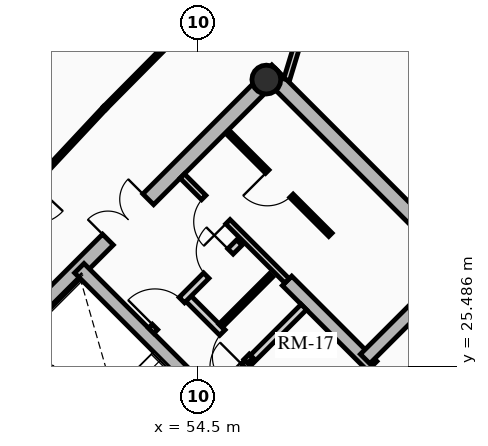
"""IFC4 building model, lengths in metres.
Left out: names, types, materials, properties, quantities, classifications, styles, units other than length and angle.
Written with IfcOpenShell. Run it as: python <this file> out.ifc"""

import sys

from ifc_helpers import new_model, si_unit, direction, frame, frame_2d, origin, origin_2d, place, context, subcontext, project, spatial, rectangle, hollow_circle, extrude, source, transform, mapped, element, fill, save


model = new_model("IFC4")
c1 = context("Model", 3, precision=1e-05, world=origin(), true_north=direction((0.0, 1.0)))
c2 = subcontext(c1, "Body", "Model", "MODEL_VIEW")
j1 = project(units=[si_unit("LENGTHUNIT", "METRE"), si_unit("PLANEANGLEUNIT", "RADIAN")], contexts=[c1])
p1 = place(None, origin())
s1 = spatial("IfcSite", under=j1, at=p1, CompositionType="ELEMENT")
p2 = place(p1, origin())
s2 = spatial("IfcBuilding", under=s1, at=p2, CompositionType="ELEMENT")
p3 = place(p2, frame((0.0, 0.0, 186.52)))
s3 = spatial("IfcBuildingStorey", under=s2, at=p3, CompositionType="ELEMENT", Elevation=186.52)
for number, where, z_axis, x_axis in (
    (1, (58.702, 15.732, 0.0), (0.0, 0.0, 1.0), (-0.707, 0.707, 0.0)),
    (2, (66.268, 23.298, 0.0), (0.0, 0.0, 1.0), (-0.707, 0.707, 0.0)),
):
    element("IfcWall", number, at=place(p3, frame(where, z_axis=z_axis, x_axis=x_axis)), inside=s3, PredefinedType="SHEAR", context=c2, shape_type="SweptSolid", body=[
        extrude(rectangle(XDim=14.1, YDim=0.4, at=frame_2d((7.05, 0.0))), origin(), (0.0, 0.0, 1.0), 2.91),
    ])
p4 = place(p3, frame((48.873, 25.561, 0.0), z_axis=(0.0, 0.0, 1.0), x_axis=(0.707106781187, 0.707106781187, 0.0)))
e3 = element("IfcWall", 3, at=p4, inside=s3, PredefinedType="SHEAR", context=c2, shape_type="SweptSolid", body=[
    extrude(rectangle(XDim=10.7, YDim=0.4, at=frame_2d((5.35, 0.0))), origin(), (0.0, 0.0, 1.0), 2.91),
])
m1 = source(origin(), c2, "Body", "SweptSolid", [
    extrude(rectangle(XDim=1.5, YDim=2.02, at=frame_2d((0.75, 1.01))), frame((0.0, 0.21, 0.0), z_axis=(0.0, -1.0, 0.0), x_axis=(1.0, 0.0, 0.0)), (0.0, 0.0, 1.0), 0.42),
])
p5 = place(p4, frame((4.6, 0.0, 0.0)))
e4 = element("IfcOpeningElement", 4, at=p5, cuts=e3, PredefinedType="OPENING", context=c2, shape_type="MappedRepresentation", body=[
    mapped(m1, transform((0.0, 0.0, 0.0), x_axis=(1.0, 0.0, 0.0), y_axis=(0.0, 1.0, 0.0), z_axis=(0.0, 0.0, 1.0), scale=1.0)),
])
p6 = place(p3, frame((61.06, 18.373, 0.0), z_axis=(0.0, 0.0, 1.0), x_axis=(-0.707106781187, 0.707106781187, 0.0)))
e5 = element("IfcWall", 5, at=p6, inside=s3, PredefinedType="SHEAR", context=c2, shape_type="SweptSolid", body=[
    extrude(rectangle(XDim=13.7, YDim=0.35, at=frame_2d((6.85, 0.0))), origin(), (0.0, 0.0, 1.0), 2.91),
])
m2 = source(origin(), c2, "Body", "SweptSolid", [
    extrude(rectangle(XDim=1.1, YDim=2.015, at=frame_2d((0.55, 1.007))), frame((0.0, 0.185, 0.0), z_axis=(0.0, -1.0, 0.0), x_axis=(1.0, 0.0, 0.0)), (0.0, 0.0, 1.0), 0.37),
])
p7 = place(p6, frame((4.85, 0.0, 0.0)))
e6 = element("IfcOpeningElement", 6, at=p7, cuts=e5, PredefinedType="OPENING", context=c2, shape_type="MappedRepresentation", body=[
    mapped(m2, transform((0.0, 0.0, 0.0), x_axis=(1.0, 0.0, 0.0), y_axis=(0.0, 1.0, 0.0), z_axis=(0.0, 0.0, 1.0), scale=1.0)),
])
p8 = place(p6, frame((0.625, 0.0, 0.0)))
e7 = element("IfcOpeningElement", 7, at=p8, cuts=e5, PredefinedType="OPENING", context=c2, shape_type="MappedRepresentation", body=[
    mapped(m2, transform((0.0, 0.0, 0.0), x_axis=(1.0, 0.0, 0.0), y_axis=(0.0, 1.0, 0.0), z_axis=(0.0, 0.0, 1.0), scale=1.0)),
])
p9 = place(p6, frame((2.625, 0.0, 0.0)))
e8 = element("IfcOpeningElement", 8, at=p9, cuts=e5, PredefinedType="OPENING", context=c2, shape_type="MappedRepresentation", body=[
    mapped(m2, transform((0.0, 0.0, 0.0), x_axis=(1.0, 0.0, 0.0), y_axis=(0.0, 1.0, 0.0), z_axis=(0.0, 0.0, 1.0), scale=1.0)),
])
m3 = source(origin(), c2, "Body", "SweptSolid", [
    extrude(rectangle(XDim=1.15, YDim=2.02, at=frame_2d((0.575, 1.01))), frame((0.0, 0.185, 0.0), z_axis=(0.0, -1.0, 0.0), x_axis=(1.0, 0.0, 0.0)), (0.0, 0.0, 1.0), 0.37),
])
p10 = place(p6, frame((7.27, 0.0, 0.0)))
e9 = element("IfcOpeningElement", 9, at=p10, cuts=e5, PredefinedType="OPENING", context=c2, shape_type="MappedRepresentation", body=[
    mapped(m3, transform((0.0, 0.0, 0.0), x_axis=(1.0, 0.0, 0.0), y_axis=(0.0, 1.0, 0.0), z_axis=(0.0, 0.0, 1.0), scale=1.0)),
])
p11 = place(p3, frame((63.627, 20.94, 0.0), z_axis=(0.0, 0.0, 1.0), x_axis=(-0.707119496762, 0.707094065383, 0.0)))
e10 = element("IfcWall", 10, at=p11, inside=s3, PredefinedType="SHEAR", context=c2, shape_type="SweptSolid", body=[
    extrude(rectangle(XDim=9.6, YDim=0.35, at=frame_2d((4.8, 0.0))), origin(), (0.0, 0.0, 1.0), 2.91),
])
p12 = place(p11, frame((5.28, 0.0, 0.0)))
e11 = element("IfcOpeningElement", 11, at=p12, cuts=e10, PredefinedType="OPENING", context=c2, shape_type="MappedRepresentation", body=[
    mapped(m3, transform((0.0, 0.0, 0.0), x_axis=(1.0, 0.0, 0.0), y_axis=(0.0, 1.0, 0.0), z_axis=(0.0, 0.0, 1.0), scale=1.0)),
])
p13 = place(p3, frame((53.922, 21.141, 0.0), z_axis=(0.0, 0.0, 1.0), x_axis=(-0.707106781187, 0.707106781187, 0.0)))
e12 = element("IfcWall", 12, at=p13, inside=s3, PredefinedType="SHEAR", context=c2, shape_type="SweptSolid", body=[
    extrude(rectangle(XDim=6.695, YDim=0.35, at=frame_2d((3.348, 0.0))), origin(), (0.0, 0.0, 1.0), 2.91),
])
p14 = place(p3, frame((58.893, 25.674, 0.0), z_axis=(0.0, 0.0, 1.0), x_axis=(0.707106781187, 0.707106781187, 0.0)))
e13 = element("IfcWall", 13, at=p14, inside=s3, PredefinedType="SHEAR", context=c2, shape_type="SweptSolid", body=[
    extrude(rectangle(XDim=3.285, YDim=0.35, at=frame_2d((1.643, 0.0))), origin(), (0.0, 0.0, 1.0), 2.91),
])
p15 = place(p3, frame((56.294, 33.024, 0.0), z_axis=(0.0, 0.0, 1.0), x_axis=(0.707106781187, 0.707106781187, 0.0)))
e14 = element("IfcColumn", 14, at=p15, inside=s3, PredefinedType="COLUMN", context=c2, shape_type="SweptSolid", body=[
    extrude(hollow_circle(Radius=0.38, WallThickness=0.032, at=origin_2d()), origin(), (0.0, 0.0, 1.0), 2.91),
])
p16 = place(p3, frame((54.961, 24.719, 0.0), z_axis=(0.0, 0.0, 1.0), x_axis=(0.707106781187, 0.707106781187, 0.0)))
e15 = element("IfcWall", 15, at=p16, inside=s3, PredefinedType="PARTITIONING", context=c2, shape_type="SweptSolid", body=[
    extrude(rectangle(XDim=3.28, YDim=0.2, at=frame_2d((1.64, 0.0))), origin(), (0.0, 0.0, 1.0), 2.675),
])
m4 = source(origin(), c2, "Body", "SweptSolid", [
    extrude(rectangle(XDim=0.9, YDim=2.005, at=frame_2d((0.45, 1.002))), frame((0.0, 0.11, 0.0), z_axis=(0.0, -1.0, 0.0), x_axis=(1.0, 0.0, 0.0)), (0.0, 0.0, 1.0), 0.22),
])
p17 = place(p16, frame((0.16, 0.0, 0.0)))
e16 = element("IfcOpeningElement", 16, at=p17, cuts=e15, PredefinedType="OPENING", context=c2, shape_type="MappedRepresentation", body=[
    mapped(m4, transform((0.0, 0.0, 0.0), x_axis=(1.0, 0.0, 0.0), y_axis=(0.0, 1.0, 0.0), z_axis=(0.0, 0.0, 1.0), scale=1.0)),
])
p18 = place(p3, frame((55.874, 25.631, 0.0), z_axis=(0.0, 0.0, 1.0), x_axis=(-0.707157639372, 0.707055919343, 0.0)))
e17 = element("IfcWall", 17, at=p18, inside=s3, PredefinedType="PARTITIONING", context=c2, shape_type="SweptSolid", body=[
    extrude(rectangle(XDim=2.4, YDim=0.2, at=frame_2d((1.2, 0.0))), origin(), (0.0, 0.0, 1.0), 2.675),
])
p19 = place(p18, frame((0.14, 0.0, 0.0)))
e18 = element("IfcOpeningElement", 18, at=p19, cuts=e17, PredefinedType="OPENING", context=c2, shape_type="MappedRepresentation", body=[
    mapped(m4, transform((0.0, 0.0, 0.0), x_axis=(1.0, 0.0, 0.0), y_axis=(0.0, 1.0, 0.0), z_axis=(0.0, 0.0, 1.0), scale=1.0)),
])
p20 = place(p3, frame((53.264, 26.416, 0.0), z_axis=(0.0, 0.0, 1.0), x_axis=(0.707106781187, 0.707106781187, 0.0)))
e19 = element("IfcWall", 19, at=p20, inside=s3, PredefinedType="PARTITIONING", context=c2, shape_type="SweptSolid", body=[
    extrude(rectangle(XDim=3.28, YDim=0.2, at=frame_2d((1.64, 0.0))), origin(), (0.0, 0.0, 1.0), 2.675),
])
m5 = source(origin(), c2, "Body", "SweptSolid", [
    extrude(rectangle(XDim=1.0, YDim=2.015, at=frame_2d((0.5, 1.007))), frame((0.0, 0.11, 0.0), z_axis=(0.0, -1.0, 0.0), x_axis=(1.0, 0.0, 0.0)), (0.0, 0.0, 1.0), 0.22),
])
p21 = place(p20, frame((0.14, 0.0, 0.0)))
e20 = element("IfcOpeningElement", 20, at=p21, cuts=e19, PredefinedType="OPENING", context=c2, shape_type="MappedRepresentation", body=[
    mapped(m5, transform((0.0, 0.0, 0.0), x_axis=(1.0, 0.0, 0.0), y_axis=(0.0, 1.0, 0.0), z_axis=(0.0, 0.0, 1.0), scale=1.0)),
])
p22 = place(p20, frame((2.05, 0.0, 0.0)))
e21 = element("IfcOpeningElement", 21, at=p22, cuts=e19, PredefinedType="OPENING", context=c2, shape_type="MappedRepresentation", body=[
    mapped(m4, transform((0.0, 0.0, 0.0), x_axis=(1.0, 0.0, 0.0), y_axis=(0.0, 1.0, 0.0), z_axis=(0.0, 0.0, 1.0), scale=1.0)),
])
p23 = place(p3, frame((55.089, 26.543, 0.0), z_axis=(0.0, 0.0, 1.0), x_axis=(0.707106781187, 0.707106781187, 0.0)))
e22 = element("IfcWall", 22, at=p23, inside=s3, PredefinedType="PARTITIONING", context=c2, shape_type="SweptSolid", body=[
    extrude(rectangle(XDim=1.88, YDim=0.125, at=frame_2d((0.94, 0.0))), origin(), (0.0, 0.0, 1.0), 2.675),
])
p24 = place(p3, frame((56.839, 27.728, 0.0), z_axis=(0.0, 0.0, 1.0), x_axis=(-0.707106781187, 0.707106781187, 0.0)))
e23 = element("IfcWall", 23, at=p24, inside=s3, PredefinedType="PARTITIONING", context=c2, shape_type="SweptSolid", body=[
    extrude(rectangle(XDim=3.9, YDim=0.16, at=frame_2d((1.95, 0.0))), origin(), (0.0, 0.0, 1.0), 2.675),
])
m6 = source(origin(), c2, "Body", "SweptSolid", [
    extrude(rectangle(XDim=0.9, YDim=2.005, at=frame_2d((0.45, 1.002))), frame((0.0, 0.09, 0.0), z_axis=(0.0, -1.0, 0.0), x_axis=(1.0, 0.0, 0.0)), (0.0, 0.0, 1.0), 0.18),
])
p25 = place(p24, frame((2.2, 0.0, 0.0)))
e24 = element("IfcOpeningElement", 24, at=p25, cuts=e23, PredefinedType="OPENING", context=c2, shape_type="MappedRepresentation", body=[
    mapped(m6, transform((0.0, 0.0, 0.0), x_axis=(1.0, 0.0, 0.0), y_axis=(0.0, 1.0, 0.0), z_axis=(0.0, 0.0, 1.0), scale=1.0)),
])
p26 = place(p3, frame((57.981, 28.941, 0.0), z_axis=(0.0, 0.0, 1.0), x_axis=(-0.707074823725, 0.707138737204, 0.0)))
e25 = element("IfcWall", 25, at=p26, inside=s3, PredefinedType="PARTITIONING", context=c2, shape_type="SweptSolid", body=[
    extrude(rectangle(XDim=3.82, YDim=0.125, at=frame_2d((1.91, 0.0))), origin(), (0.0, 0.0, 1.0), 2.675),
])
m7 = source(origin(), c2, "Body", "SweptSolid", [
    extrude(rectangle(XDim=0.9, YDim=2.005, at=frame_2d((0.45, 1.002))), frame((0.0, 0.073, 0.0), z_axis=(0.0, -1.0, 0.0), x_axis=(1.0, 0.0, 0.0)), (0.0, 0.0, 1.0), 0.145),
])
p27 = place(p26, frame((1.45, 0.0, 0.0)))
e26 = element("IfcOpeningElement", 26, at=p27, cuts=e25, PredefinedType="OPENING", context=c2, shape_type="MappedRepresentation", body=[
    mapped(m7, transform((0.0, 0.0, 0.0), x_axis=(1.0, 0.0, 0.0), y_axis=(0.0, 1.0, 0.0), z_axis=(0.0, 0.0, 1.0), scale=1.0)),
])
p28 = place(p3, frame((54.427, 34.683, 0.0), z_axis=(0.0, 0.0, 1.0), x_axis=(-0.704178989986, -0.710022499687, 0.0)))
e27 = element("IfcWall", 27, at=p28, inside=s3, PredefinedType="MOVABLE", context=c2, shape_type="SweptSolid", body=[
    extrude(rectangle(XDim=3.384, YDim=0.1, at=frame_2d((1.692, 0.0))), origin(), (0.0, 0.0, 1.0), 2.245),
])
p29 = place(p3, frame((52.043, 32.28, 0.0), z_axis=(0.0, 0.0, 1.0), x_axis=(-0.682606081633, -0.730786519661, 0.0)))
e28 = element("IfcWall", 28, at=p29, inside=s3, PredefinedType="MOVABLE", context=c2, shape_type="SweptSolid", body=[
    extrude(rectangle(XDim=6.527, YDim=0.1, at=frame_2d((3.263, 0.0))), origin(), (0.0, 0.0, 1.0), 2.245),
])
m8 = source(origin(), c2, "Body", "SweptSolid", [
    extrude(rectangle(XDim=1.05, YDim=2.015, at=frame_2d((0.525, 1.007))), frame((0.0, 0.06, 0.0), z_axis=(0.0, -1.0, 0.0), x_axis=(1.0, 0.0, 0.0)), (0.0, 0.0, 1.0), 0.12),
])
p30 = place(p29, frame((2.738, 0.0, 0.0)))
e29 = element("IfcOpeningElement", 29, at=p30, cuts=e28, PredefinedType="OPENING", context=c2, shape_type="MappedRepresentation", body=[
    mapped(m8, transform((0.0, 0.0, 0.0), x_axis=(1.0, 0.0, 0.0), y_axis=(0.0, 1.0, 0.0), z_axis=(0.0, 0.0, 1.0), scale=1.0)),
])
p31 = place(p3, frame((56.828, 33.021, 0.0), z_axis=(0.0, 0.0, 1.0), x_axis=(0.292139093972, 0.956375841274, 0.0)))
e30 = element("IfcWall", 30, at=p31, inside=s3, PredefinedType="PARTITIONING", context=c2, shape_type="SweptSolid", body=[
    extrude(rectangle(XDim=2.186, YDim=0.16, at=frame_2d((1.093, 0.0))), origin(), (0.0, 0.0, 1.0), 2.245),
])
m9 = source(origin(), c2, "Body", "SweptSolid", [
    extrude(rectangle(XDim=1.05, YDim=2.015, at=frame_2d((0.525, 1.007))), frame((0.0, 0.09, 0.0), z_axis=(0.0, -1.0, 0.0), x_axis=(1.0, 0.0, 0.0)), (0.0, 0.0, 1.0), 0.18),
])
p32 = place(p31, frame((0.936, 0.0, 0.0)))
e31 = element("IfcOpeningElement", 31, at=p32, cuts=e30, PredefinedType="OPENING", context=c2, shape_type="MappedRepresentation", body=[
    mapped(m9, transform((0.0, 0.0, 0.0), x_axis=(1.0, 0.0, 0.0), y_axis=(0.0, 1.0, 0.0), z_axis=(0.0, 0.0, 1.0), scale=1.0)),
])
m10 = source(origin(), c2, "Body", "SweptSolid", [
    extrude(rectangle(XDim=1.15, YDim=2.02, at=frame_2d((0.575, 1.01))), frame((0.0, 0.025, 0.0), z_axis=(0.0, -1.0, 0.0), x_axis=(1.0, 0.0, 0.0)), (0.0, 0.0, 1.0), 0.05),
])
p33 = place(p12, origin())
e32 = element("IfcDoor", 32, at=p33, inside=s3, OperationType="SINGLE_SWING_LEFT", PredefinedType="DOOR", context=c2, shape_type="MappedRepresentation", body=[
    mapped(m10, transform((0.0, 0.0, 0.0), x_axis=(1.0, 0.0, 0.0), y_axis=(0.0, 1.0, 0.0), z_axis=(0.0, 0.0, 1.0), scale=1.0)),
])
fill(e11, e32)
m11 = source(origin(), c2, "Body", "SweptSolid", [
    extrude(rectangle(XDim=1.5, YDim=2.02, at=frame_2d((0.75, 1.01))), frame((0.0, 0.025, 0.0), z_axis=(0.0, -1.0, 0.0), x_axis=(1.0, 0.0, 0.0)), (0.0, 0.0, 1.0), 0.05),
])
p34 = place(p5, origin())
e33 = element("IfcDoor", 33, at=p34, inside=s3, OperationType="DOUBLE_DOOR_SINGLE_SWING", PredefinedType="DOOR", context=c2, shape_type="MappedRepresentation", body=[
    mapped(m11, transform((0.0, 0.0, 0.0), x_axis=(1.0, 0.0, 0.0), y_axis=(0.0, 1.0, 0.0), z_axis=(0.0, 0.0, 1.0), scale=1.0)),
])
fill(e4, e33)
m12 = source(origin(), c2, "Body", "SweptSolid", [
    extrude(rectangle(XDim=0.9, YDim=2.005, at=frame_2d((0.45, 1.002))), frame((0.0, 0.025, 0.0), z_axis=(0.0, -1.0, 0.0), x_axis=(1.0, 0.0, 0.0)), (0.0, 0.0, 1.0), 0.05),
])
p35 = place(p17, origin())
e34 = element("IfcDoor", 34, at=p35, inside=s3, OperationType="SINGLE_SWING_RIGHT", PredefinedType="DOOR", context=c2, shape_type="MappedRepresentation", body=[
    mapped(m12, transform((0.0, 0.0, 0.0), x_axis=(1.0, 0.0, 0.0), y_axis=(0.0, 1.0, 0.0), z_axis=(0.0, 0.0, 1.0), scale=1.0)),
])
fill(e16, e34)
m13 = source(origin(), c2, "Body", "SweptSolid", [
    extrude(rectangle(XDim=1.0, YDim=2.015, at=frame_2d((0.5, 1.007))), frame((0.0, 0.025, 0.0), z_axis=(0.0, -1.0, 0.0), x_axis=(1.0, 0.0, 0.0)), (0.0, 0.0, 1.0), 0.05),
])
p36 = place(p21, origin())
e35 = element("IfcDoor", 35, at=p36, inside=s3, OperationType="SINGLE_SWING_LEFT", PredefinedType="DOOR", context=c2, shape_type="MappedRepresentation", body=[
    mapped(m13, transform((0.0, 0.0, 0.0), x_axis=(1.0, 0.0, 0.0), y_axis=(0.0, 1.0, 0.0), z_axis=(0.0, 0.0, 1.0), scale=1.0)),
])
fill(e20, e35)
p37 = place(p19, origin())
e36 = element("IfcDoor", 36, at=p37, inside=s3, OperationType="SINGLE_SWING_LEFT", PredefinedType="DOOR", context=c2, shape_type="MappedRepresentation", body=[
    mapped(m12, transform((0.0, 0.0, 0.0), x_axis=(1.0, 0.0, 0.0), y_axis=(0.0, 1.0, 0.0), z_axis=(0.0, 0.0, 1.0), scale=1.0)),
])
fill(e18, e36)
p38 = place(p22, origin())
e37 = element("IfcDoor", 37, at=p38, inside=s3, OperationType="SINGLE_SWING_RIGHT", PredefinedType="DOOR", context=c2, shape_type="MappedRepresentation", body=[
    mapped(m12, transform((0.0, 0.0, 0.0), x_axis=(1.0, 0.0, 0.0), y_axis=(0.0, 1.0, 0.0), z_axis=(0.0, 0.0, 1.0), scale=1.0)),
])
fill(e21, e37)
p39 = place(p25, origin())
e38 = element("IfcDoor", 38, at=p39, inside=s3, OperationType="SINGLE_SWING_LEFT", PredefinedType="DOOR", context=c2, shape_type="MappedRepresentation", body=[
    mapped(m12, transform((0.0, 0.0, 0.0), x_axis=(1.0, 0.0, 0.0), y_axis=(0.0, 1.0, 0.0), z_axis=(0.0, 0.0, 1.0), scale=1.0)),
])
fill(e24, e38)
p40 = place(p27, origin())
e39 = element("IfcDoor", 39, at=p40, inside=s3, OperationType="SINGLE_SWING_RIGHT", PredefinedType="DOOR", context=c2, shape_type="MappedRepresentation", body=[
    mapped(m12, transform((0.0, 0.0, 0.0), x_axis=(1.0, 0.0, 0.0), y_axis=(0.0, 1.0, 0.0), z_axis=(0.0, 0.0, 1.0), scale=1.0)),
])
fill(e26, e39)
save(model, sys.argv[1])
